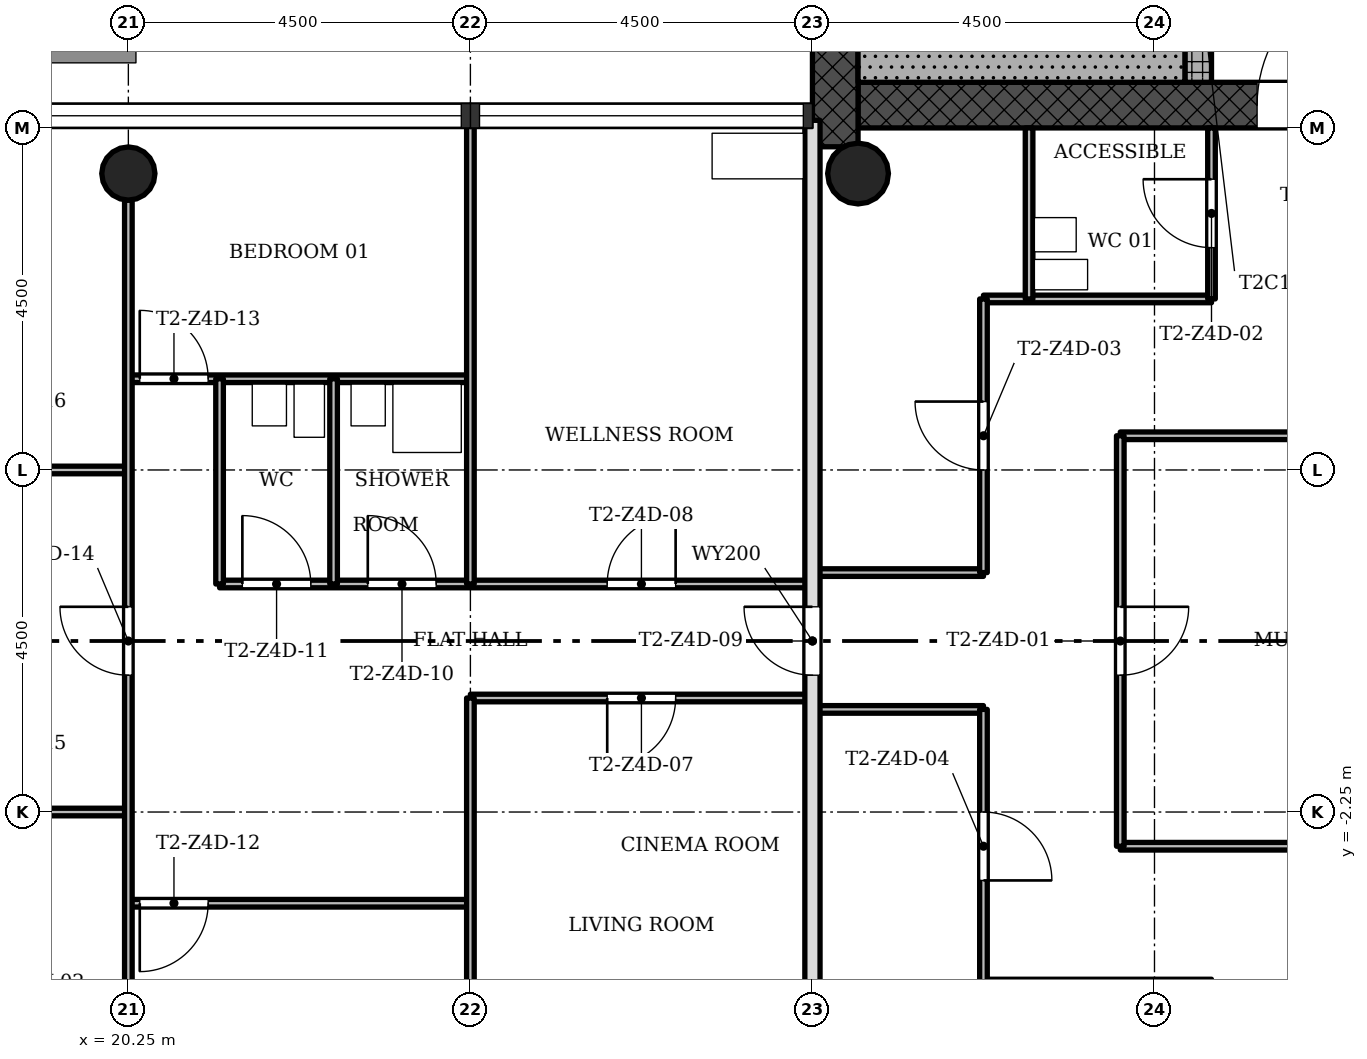
"""IFC4 building model, lengths in metres.
Left out: names, types, materials, properties, quantities, classifications, styles, units other than length and angle.
Written with IfcOpenShell. Run it as: python <this file> out.ifc"""

import sys

from ifc_helpers import new_model, si_unit, direction, frame, frame_2d, origin, origin_2d, place, context, subcontext, project, spatial, rectangle, hollow_circle, extrude, element, fill, save


model = new_model("IFC4")
c1 = context("Model", 3, precision=1e-05, world=origin(), true_north=direction((0.0, 1.0)))
c2 = subcontext(c1, "Body", "Model", "MODEL_VIEW")
j1 = project(units=[si_unit("LENGTHUNIT", "METRE"), si_unit("PLANEANGLEUNIT", "RADIAN")], contexts=[c1])
p1 = place(None, origin())
s1 = spatial("IfcSite", under=j1, at=p1, CompositionType="ELEMENT")
p2 = place(p1, origin())
s2 = spatial("IfcBuilding", under=s1, at=p2, CompositionType="ELEMENT")
p3 = place(p2, frame((0.0, 0.0, 196.0)))
s3 = spatial("IfcBuildingStorey", under=s2, at=p3, CompositionType="ELEMENT", Elevation=196.0)
p4 = place(p3, frame((29.85, 7.05, 0.0), z_axis=(0.0, 0.0, 1.0), x_axis=(1.0, 0.0, 0.0)))
e1 = element("IfcWall", 1, at=p4, inside=s3, PredefinedType="SHEAR", context=c2, shape_type="SweptSolid", body=[
    extrude(rectangle(XDim=12.9, YDim=0.6, at=frame_2d((6.45, 0.0))), origin(), (0.0, 0.0, 1.0), 3.4),
])
p5 = place(p4, frame((5.25, 0.0, 0.0)))
e2 = element("IfcOpeningElement", 2, at=p5, cuts=e1, PredefinedType="OPENING", context=c2, shape_type="SweptSolid", body=[
    extrude(rectangle(XDim=1.8, YDim=2.1, at=frame_2d((0.9, 1.05))), frame((0.0, 0.31, 0.0), z_axis=(0.0, -1.0, 0.0), x_axis=(1.0, 0.0, 0.0)), (0.0, 0.0, 1.0), 0.62),
])
p6 = place(p3, frame((29.55, 15.15, 0.0), z_axis=(0.0, 0.0, 1.0), x_axis=(0.0, -1.0, 0.0)))
e3 = element("IfcWall", 3, at=p6, inside=s3, PredefinedType="SHEAR", context=c2, shape_type="SweptSolid", body=[
    extrude(rectangle(XDim=8.648, YDim=0.6, at=frame_2d((4.324, 0.0))), origin(), (0.0, 0.0, 1.0), 3.4),
])
p7 = place(p3, frame((34.325, 7.35, 0.0), z_axis=(0.0, 0.0, 1.0), x_axis=(0.0, 1.0, 0.0)))
e4 = element("IfcWall", 4, at=p7, inside=s3, PredefinedType="SHEAR", context=c2, shape_type="SweptSolid", body=[
    extrude(rectangle(XDim=7.8, YDim=0.35, at=frame_2d((3.9, 0.0))), origin(), (0.0, 0.0, 1.0), 3.4),
])
p8 = place(p7, frame((1.05, 0.0, 0.0)))
e5 = element("IfcOpeningElement", 5, at=p8, cuts=e4, PredefinedType="OPENING", context=c2, shape_type="SweptSolid", body=[
    extrude(rectangle(XDim=0.9, YDim=2.1, at=frame_2d((0.45, 1.05))), frame((0.0, 0.185, 0.0), z_axis=(0.0, -1.0, 0.0), x_axis=(1.0, 0.0, 0.0)), (0.0, 0.0, 1.0), 0.37),
])
p9 = place(p3, frame((20.25, 6.15, 0.0), z_axis=(0.0, 0.0, 1.0), x_axis=(1.0, 0.0, 0.0)))
e6 = element("IfcColumn", 6, at=p9, inside=s3, PredefinedType="COLUMN", context=c2, shape_type="SweptSolid", body=[
    extrude(hollow_circle(Radius=0.35, WallThickness=0.025, at=origin_2d()), origin(), (0.0, 0.0, 1.0), 3.4),
])
p10 = place(p3, frame((29.85, 6.15, 0.0), z_axis=(0.0, 0.0, 1.0), x_axis=(1.0, 0.0, 0.0)))
e7 = element("IfcColumn", 7, at=p10, inside=s3, PredefinedType="COLUMN", context=c2, shape_type="SweptSolid", body=[
    extrude(hollow_circle(Radius=0.4, WallThickness=0.028, at=origin_2d()), origin(), (0.0, 0.0, 1.0), 3.4),
])
p11 = place(p3, frame((24.75, -3.45, 0.0), z_axis=(0.0, 0.0, 1.0), x_axis=(-1.0, 0.0, 0.0)))
e8 = element("IfcWall", 8, at=p11, inside=s3, PredefinedType="PARTITIONING", context=c2, shape_type="SweptSolid", body=[
    extrude(rectangle(XDim=4.5, YDim=0.1, at=frame_2d((2.25, 0.0))), origin(), (0.0, 0.0, 1.0), 3.0),
])
p12 = place(p11, frame((3.45, 0.0, 0.0)))
e9 = element("IfcOpeningElement", 9, at=p12, cuts=e8, PredefinedType="OPENING", context=c2, shape_type="SweptSolid", body=[
    extrude(rectangle(XDim=0.9, YDim=2.1, at=frame_2d((0.45, 1.05))), frame((0.0, 0.06, 0.0), z_axis=(0.0, -1.0, 0.0), x_axis=(1.0, 0.0, 0.0)), (0.0, 0.0, 1.0), 0.12),
])
p13 = place(p3, frame((38.7, -2.7, 0.0), z_axis=(0.0, 0.0, 1.0), x_axis=(-1.0, 0.0, 0.0)))
e10 = element("IfcWall", 10, at=p13, inside=s3, PredefinedType="PARTITIONING", context=c2, shape_type="SweptSolid", body=[
    extrude(rectangle(XDim=5.4, YDim=0.1, at=frame_2d((2.7, 0.0))), origin(), (0.0, 0.0, 1.0), 3.0),
])
p14 = place(p3, frame((20.25, -2.25, 0.0), z_axis=(0.0, 0.0, 1.0), x_axis=(-1.0, 0.0, 0.0)))
e11 = element("IfcWall", 11, at=p14, inside=s3, PredefinedType="PARTITIONING", context=c2, shape_type="SweptSolid", body=[
    extrude(rectangle(XDim=4.6, YDim=0.1, at=frame_2d((2.3, 0.0))), origin(), (0.0, 0.0, 1.0), 3.0),
])
p15 = place(p14, frame((1.05, 0.0, 0.0)))
e12 = element("IfcOpeningElement", 12, at=p15, cuts=e11, PredefinedType="OPENING", context=c2, shape_type="SweptSolid", body=[
    extrude(rectangle(XDim=0.9, YDim=2.1, at=frame_2d((0.45, 1.05))), frame((0.0, 0.06, 0.0), z_axis=(0.0, -1.0, 0.0), x_axis=(1.0, 0.0, 0.0)), (0.0, 0.0, 1.0), 0.12),
])
p16 = place(p3, frame((31.5, -0.9, 0.0), z_axis=(0.0, 0.0, 1.0), x_axis=(-1.0, 0.0, 0.0)))
e13 = element("IfcWall", 13, at=p16, inside=s3, PredefinedType="PARTITIONING", context=c2, shape_type="SweptSolid", body=[
    extrude(rectangle(XDim=2.25, YDim=0.1, at=frame_2d((1.125, 0.0))), origin(), (0.0, 0.0, 1.0), 3.0),
])
p17 = place(p3, frame((29.25, -0.75, 0.0), z_axis=(0.0, 0.0, 1.0), x_axis=(-1.0, 0.0, 0.0)))
e14 = element("IfcWall", 14, at=p17, inside=s3, PredefinedType="PARTITIONING", context=c2, shape_type="SweptSolid", body=[
    extrude(rectangle(XDim=4.5, YDim=0.1, at=frame_2d((2.25, 0.0))), origin(), (0.0, 0.0, 1.0), 3.0),
])
p18 = place(p17, frame((1.8, 0.0, 0.0)))
e15 = element("IfcOpeningElement", 15, at=p18, cuts=e14, PredefinedType="OPENING", context=c2, shape_type="SweptSolid", body=[
    extrude(rectangle(XDim=0.9, YDim=2.1, at=frame_2d((0.45, 1.05))), frame((0.0, 0.06, 0.0), z_axis=(0.0, -1.0, 0.0), x_axis=(1.0, 0.0, 0.0)), (0.0, 0.0, 1.0), 0.12),
])
p19 = place(p3, frame((29.25, 0.75, 0.0), z_axis=(0.0, 0.0, 1.0), x_axis=(-1.0, 0.0, 0.0)))
e16 = element("IfcWall", 16, at=p19, inside=s3, PredefinedType="PARTITIONING", context=c2, shape_type="SweptSolid", body=[
    extrude(rectangle(XDim=7.8, YDim=0.1, at=frame_2d((3.9, 0.0))), origin(), (0.0, 0.0, 1.0), 3.0),
])
p20 = place(p19, frame((1.8, 0.0, 0.0)))
e17 = element("IfcOpeningElement", 17, at=p20, cuts=e16, PredefinedType="OPENING", context=c2, shape_type="SweptSolid", body=[
    extrude(rectangle(XDim=0.9, YDim=2.1, at=frame_2d((0.45, 1.05))), frame((0.0, 0.06, 0.0), z_axis=(0.0, -1.0, 0.0), x_axis=(1.0, 0.0, 0.0)), (0.0, 0.0, 1.0), 0.12),
])
p21 = place(p19, frame((4.95, 0.0, 0.0)))
e18 = element("IfcOpeningElement", 18, at=p21, cuts=e16, PredefinedType="OPENING", context=c2, shape_type="SweptSolid", body=[
    extrude(rectangle(XDim=0.9, YDim=2.1, at=frame_2d((0.45, 1.05))), frame((0.0, 0.06, 0.0), z_axis=(0.0, -1.0, 0.0), x_axis=(1.0, 0.0, 0.0)), (0.0, 0.0, 1.0), 0.12),
])
p22 = place(p19, frame((6.6, 0.0, 0.0)))
e19 = element("IfcOpeningElement", 19, at=p22, cuts=e16, PredefinedType="OPENING", context=c2, shape_type="SweptSolid", body=[
    extrude(rectangle(XDim=0.9, YDim=2.1, at=frame_2d((0.45, 1.05))), frame((0.0, 0.06, 0.0), z_axis=(0.0, -1.0, 0.0), x_axis=(1.0, 0.0, 0.0)), (0.0, 0.0, 1.0), 0.12),
])
p23 = place(p3, frame((31.5, 0.9, 0.0), z_axis=(0.0, 0.0, 1.0), x_axis=(-1.0, 0.0, 0.0)))
e20 = element("IfcWall", 20, at=p23, inside=s3, PredefinedType="PARTITIONING", context=c2, shape_type="SweptSolid", body=[
    extrude(rectangle(XDim=2.25, YDim=0.1, at=frame_2d((1.125, 0.0))), origin(), (0.0, 0.0, 1.0), 3.0),
])
p24 = place(p3, frame((20.25, 2.25, 0.0), z_axis=(0.0, 0.0, 1.0), x_axis=(-1.0, 0.0, 0.0)))
e21 = element("IfcWall", 21, at=p24, inside=s3, PredefinedType="PARTITIONING", context=c2, shape_type="SweptSolid", body=[
    extrude(rectangle(XDim=4.6, YDim=0.1, at=frame_2d((2.3, 0.0))), origin(), (0.0, 0.0, 1.0), 3.0),
])
p25 = place(p24, frame((1.05, 0.0, 0.0)))
e22 = element("IfcOpeningElement", 22, at=p25, cuts=e21, PredefinedType="OPENING", context=c2, shape_type="SweptSolid", body=[
    extrude(rectangle(XDim=0.9, YDim=2.1, at=frame_2d((0.45, 1.05))), frame((0.0, 0.06, 0.0), z_axis=(0.0, -1.0, 0.0), x_axis=(1.0, 0.0, 0.0)), (0.0, 0.0, 1.0), 0.12),
])
p26 = place(p3, frame((38.7, 2.7, 0.0), z_axis=(0.0, 0.0, 1.0), x_axis=(-1.0, 0.0, 0.0)))
e23 = element("IfcWall", 23, at=p26, inside=s3, PredefinedType="PARTITIONING", context=c2, shape_type="SweptSolid", body=[
    extrude(rectangle(XDim=5.4, YDim=0.1, at=frame_2d((2.7, 0.0))), origin(), (0.0, 0.0, 1.0), 3.0),
])
p27 = place(p3, frame((24.75, 3.45, 0.0), z_axis=(0.0, 0.0, 1.0), x_axis=(-1.0, 0.0, 0.0)))
e24 = element("IfcWall", 24, at=p27, inside=s3, PredefinedType="PARTITIONING", context=c2, shape_type="SweptSolid", body=[
    extrude(rectangle(XDim=4.5, YDim=0.1, at=frame_2d((2.25, 0.0))), origin(), (0.0, 0.0, 1.0), 3.0),
])
p28 = place(p27, frame((3.45, 0.0, 0.0)))
e25 = element("IfcOpeningElement", 25, at=p28, cuts=e24, PredefinedType="OPENING", context=c2, shape_type="SweptSolid", body=[
    extrude(rectangle(XDim=0.9, YDim=2.1, at=frame_2d((0.45, 1.05))), frame((0.0, 0.06, 0.0), z_axis=(0.0, -1.0, 0.0), x_axis=(1.0, 0.0, 0.0)), (0.0, 0.0, 1.0), 0.12),
])
p29 = place(p3, frame((34.5, 4.5, 0.0), z_axis=(0.0, 0.0, 1.0), x_axis=(-1.0, 0.0, 0.0)))
e26 = element("IfcWall", 26, at=p29, inside=s3, PredefinedType="PARTITIONING", context=c2, shape_type="SweptSolid", body=[
    extrude(rectangle(XDim=3.0, YDim=0.1, at=frame_2d((1.5, 0.0))), origin(), (0.0, 0.0, 1.0), 3.0),
])
p30 = place(p3, frame((34.5, 4.5, 0.0), z_axis=(0.0, 0.0, 1.0), x_axis=(0.0, 1.0, 0.0)))
e27 = element("IfcWall", 27, at=p30, inside=s3, PredefinedType="PARTITIONING", context=c2, shape_type="SweptSolid", body=[
    extrude(rectangle(XDim=2.25, YDim=0.1, at=frame_2d((1.125, 0.0))), origin(), (0.0, 0.0, 1.0), 3.0),
])
p31 = place(p30, frame((0.675, 0.0, 0.0)))
e28 = element("IfcOpeningElement", 28, at=p31, cuts=e27, PredefinedType="OPENING", context=c2, shape_type="SweptSolid", body=[
    extrude(rectangle(XDim=0.9, YDim=2.1, at=frame_2d((0.45, 1.05))), frame((0.0, 0.06, 0.0), z_axis=(0.0, -1.0, 0.0), x_axis=(1.0, 0.0, 0.0)), (0.0, 0.0, 1.0), 0.12),
])
p32 = place(p3, frame((33.3, -2.7, 0.0), z_axis=(0.0, 0.0, 1.0), x_axis=(0.0, 1.0, 0.0)))
e29 = element("IfcWall", 29, at=p32, inside=s3, PredefinedType="PARTITIONING", context=c2, shape_type="SweptSolid", body=[
    extrude(rectangle(XDim=5.4, YDim=0.1, at=frame_2d((2.7, 0.0))), origin(), (0.0, 0.0, 1.0), 3.0),
])
p33 = place(p32, frame((2.25, 0.0, 0.0)))
e30 = element("IfcOpeningElement", 30, at=p33, cuts=e29, PredefinedType="OPENING", context=c2, shape_type="SweptSolid", body=[
    extrude(rectangle(XDim=0.9, YDim=2.1, at=frame_2d((0.45, 1.05))), frame((0.0, 0.06, 0.0), z_axis=(0.0, -1.0, 0.0), x_axis=(1.0, 0.0, 0.0)), (0.0, 0.0, 1.0), 0.12),
])
p34 = place(p3, frame((32.1, 4.5, 0.0), z_axis=(0.0, 0.0, 1.0), x_axis=(0.0, 1.0, 0.0)))
e31 = element("IfcWall", 31, at=p34, inside=s3, PredefinedType="PARTITIONING", context=c2, shape_type="SweptSolid", body=[
    extrude(rectangle(XDim=2.25, YDim=0.1, at=frame_2d((1.125, 0.0))), origin(), (0.0, 0.0, 1.0), 3.0),
])
p35 = place(p3, frame((31.5, -4.5, 0.0), z_axis=(0.0, 0.0, 1.0), x_axis=(0.0, 1.0, 0.0)))
e32 = element("IfcWall", 32, at=p35, inside=s3, PredefinedType="PARTITIONING", context=c2, shape_type="SweptSolid", body=[
    extrude(rectangle(XDim=3.6, YDim=0.1, at=frame_2d((1.8, 0.0))), origin(), (0.0, 0.0, 1.0), 3.0),
])
p36 = place(p35, frame((1.35, 0.0, 0.0)))
e33 = element("IfcOpeningElement", 33, at=p36, cuts=e32, PredefinedType="OPENING", context=c2, shape_type="SweptSolid", body=[
    extrude(rectangle(XDim=0.9, YDim=2.1, at=frame_2d((0.45, 1.05))), frame((0.0, 0.06, 0.0), z_axis=(0.0, -1.0, 0.0), x_axis=(1.0, 0.0, 0.0)), (0.0, 0.0, 1.0), 0.12),
])
p37 = place(p3, frame((31.5, 0.9, 0.0), z_axis=(0.0, 0.0, 1.0), x_axis=(0.0, 1.0, 0.0)))
e34 = element("IfcWall", 34, at=p37, inside=s3, PredefinedType="PARTITIONING", context=c2, shape_type="SweptSolid", body=[
    extrude(rectangle(XDim=3.6, YDim=0.1, at=frame_2d((1.8, 0.0))), origin(), (0.0, 0.0, 1.0), 3.0),
])
p38 = place(p37, frame((1.35, 0.0, 0.0)))
e35 = element("IfcOpeningElement", 35, at=p38, cuts=e34, PredefinedType="OPENING", context=c2, shape_type="SweptSolid", body=[
    extrude(rectangle(XDim=0.9, YDim=2.1, at=frame_2d((0.45, 1.05))), frame((0.0, 0.06, 0.0), z_axis=(0.0, -1.0, 0.0), x_axis=(1.0, 0.0, 0.0)), (0.0, 0.0, 1.0), 0.12),
])
p39 = place(p3, frame((29.25, -6.85, 0.0), z_axis=(0.0, 0.0, 1.0), x_axis=(0.0, 1.0, 0.0)))
e36 = element("IfcWall", 36, at=p39, inside=s3, PredefinedType="SOLIDWALL", context=c2, shape_type="SweptSolid", body=[
    extrude(rectangle(XDim=13.7, YDim=0.2, at=frame_2d((6.85, 0.0))), origin(), (0.0, 0.0, 1.0), 3.0),
])
p40 = place(p39, frame((6.4, 0.0, 0.0)))
e37 = element("IfcOpeningElement", 37, at=p40, cuts=e36, PredefinedType="OPENING", context=c2, shape_type="SweptSolid", body=[
    extrude(rectangle(XDim=0.9, YDim=2.1, at=frame_2d((0.45, 1.05))), frame((0.0, 0.11, 0.0), z_axis=(0.0, -1.0, 0.0), x_axis=(1.0, 0.0, 0.0)), (0.0, 0.0, 1.0), 0.22),
])
for number, where, z_axis, x_axis in (
    (38, (24.75, -6.85, 0.0), (0.0, 0.0, 1.0), (0.0, 1.0, 0.0)),
    (39, (24.75, 0.75, 0.0), (0.0, 0.0, 1.0), (0.0, 1.0, 0.0)),
):
    element("IfcWall", number, at=place(p3, frame(where, z_axis=z_axis, x_axis=x_axis)), inside=s3, PredefinedType="PARTITIONING", context=c2, shape_type="SweptSolid", body=[
        extrude(rectangle(XDim=6.1, YDim=0.1, at=frame_2d((3.05, 0.0))), origin(), (0.0, 0.0, 1.0), 3.0),
    ])
for number, where, z_axis, x_axis in (
    (40, (22.95, 0.75, 0.0), (0.0, 0.0, 1.0), (0.0, 1.0, 0.0)),
    (41, (21.45, 0.75, 0.0), (0.0, 0.0, 1.0), (0.0, 1.0, 0.0)),
):
    element("IfcWall", number, at=place(p3, frame(where, z_axis=z_axis, x_axis=x_axis)), inside=s3, PredefinedType="PARTITIONING", context=c2, shape_type="SweptSolid", body=[
        extrude(rectangle(XDim=2.7, YDim=0.1, at=frame_2d((1.35, 0.0))), origin(), (0.0, 0.0, 1.0), 3.0),
    ])
p41 = place(p3, frame((20.25, -5.8, 0.0), z_axis=(0.0, 0.0, 1.0), x_axis=(0.0, 1.0, 0.0)))
e42 = element("IfcWall", 42, at=p41, inside=s3, PredefinedType="PARTITIONING", context=c2, shape_type="SweptSolid", body=[
    extrude(rectangle(XDim=11.6, YDim=0.1, at=frame_2d((5.8, 0.0))), origin(), (0.0, 0.0, 1.0), 3.0),
])
p42 = place(p41, frame((5.35, 0.0, 0.0)))
e43 = element("IfcOpeningElement", 43, at=p42, cuts=e42, PredefinedType="OPENING", context=c2, shape_type="SweptSolid", body=[
    extrude(rectangle(XDim=0.9, YDim=2.1, at=frame_2d((0.45, 1.05))), frame((0.0, 0.06, 0.0), z_axis=(0.0, -1.0, 0.0), x_axis=(1.0, 0.0, 0.0)), (0.0, 0.0, 1.0), 0.12),
])
p43 = place(p3, frame((34.15, 7.65, 0.0), z_axis=(0.0, 0.0, 1.0), x_axis=(-1.0, 0.0, 0.0)))
e44 = element("IfcWall", 44, at=p43, inside=s3, PredefinedType="SHEAR", context=c2, shape_type="SweptSolid", body=[
    extrude(rectangle(XDim=4.3, YDim=0.6, at=frame_2d((2.15, 0.0))), origin(), (0.0, 0.0, 1.0), 3.4),
])
p44 = place(p33, origin())
e45 = element("IfcDoor", 45, at=p44, inside=s3, OperationType="SINGLE_SWING_RIGHT", PredefinedType="DOOR", context=c2, shape_type="SweptSolid", body=[
    extrude(rectangle(XDim=0.9, YDim=2.1, at=frame_2d((0.45, 1.05))), frame((0.0, 0.025, 0.0), z_axis=(0.0, -1.0, 0.0), x_axis=(1.0, 0.0, 0.0)), (0.0, 0.0, 1.0), 0.05),
])
fill(e30, e45)
p45 = place(p31, origin())
e46 = element("IfcDoor", 46, at=p45, inside=s3, OperationType="SINGLE_SWING_LEFT", PredefinedType="DOOR", context=c2, shape_type="SweptSolid", body=[
    extrude(rectangle(XDim=0.9, YDim=2.1, at=frame_2d((0.45, 1.05))), frame((0.0, 0.025, 0.0), z_axis=(0.0, -1.0, 0.0), x_axis=(1.0, 0.0, 0.0)), (0.0, 0.0, 1.0), 0.05),
])
fill(e28, e46)
p46 = place(p38, origin())
e47 = element("IfcDoor", 47, at=p46, inside=s3, OperationType="SINGLE_SWING_LEFT", PredefinedType="DOOR", context=c2, shape_type="SweptSolid", body=[
    extrude(rectangle(XDim=0.9, YDim=2.1, at=frame_2d((0.45, 1.05))), frame((0.0, 0.025, 0.0), z_axis=(0.0, -1.0, 0.0), x_axis=(1.0, 0.0, 0.0)), (0.0, 0.0, 1.0), 0.05),
])
fill(e35, e47)
p47 = place(p36, origin())
e48 = element("IfcDoor", 48, at=p47, inside=s3, OperationType="SINGLE_SWING_LEFT", PredefinedType="DOOR", context=c2, shape_type="SweptSolid", body=[
    extrude(rectangle(XDim=0.9, YDim=2.1, at=frame_2d((0.45, 1.05))), frame((0.0, 0.025, 0.0), z_axis=(0.0, -1.0, 0.0), x_axis=(1.0, 0.0, 0.0)), (0.0, 0.0, 1.0), 0.05),
])
fill(e33, e48)
p48 = place(p18, origin())
e49 = element("IfcDoor", 49, at=p48, inside=s3, OperationType="SINGLE_SWING_LEFT", PredefinedType="DOOR", context=c2, shape_type="SweptSolid", body=[
    extrude(rectangle(XDim=0.9, YDim=2.1, at=frame_2d((0.45, 1.05))), frame((0.0, 0.025, 0.0), z_axis=(0.0, -1.0, 0.0), x_axis=(1.0, 0.0, 0.0)), (0.0, 0.0, 1.0), 0.05),
])
fill(e15, e49)
p49 = place(p20, origin())
e50 = element("IfcDoor", 50, at=p49, inside=s3, OperationType="SINGLE_SWING_LEFT", PredefinedType="DOOR", context=c2, shape_type="SweptSolid", body=[
    extrude(rectangle(XDim=0.9, YDim=2.1, at=frame_2d((0.45, 1.05))), frame((0.0, 0.025, 0.0), z_axis=(0.0, -1.0, 0.0), x_axis=(1.0, 0.0, 0.0)), (0.0, 0.0, 1.0), 0.05),
])
fill(e17, e50)
p50 = place(p40, origin())
e51 = element("IfcDoor", 51, at=p50, inside=s3, OperationType="SINGLE_SWING_LEFT", PredefinedType="DOOR", context=c2, shape_type="SweptSolid", body=[
    extrude(rectangle(XDim=0.9, YDim=2.1, at=frame_2d((0.45, 1.05))), frame((0.0, 0.025, 0.0), z_axis=(0.0, -1.0, 0.0), x_axis=(1.0, 0.0, 0.0)), (0.0, 0.0, 1.0), 0.05),
])
fill(e37, e51)
p51 = place(p21, origin())
e52 = element("IfcDoor", 52, at=p51, inside=s3, OperationType="SINGLE_SWING_RIGHT", PredefinedType="DOOR", context=c2, shape_type="SweptSolid", body=[
    extrude(rectangle(XDim=0.9, YDim=2.1, at=frame_2d((0.45, 1.05))), frame((0.0, 0.025, 0.0), z_axis=(0.0, -1.0, 0.0), x_axis=(1.0, 0.0, 0.0)), (0.0, 0.0, 1.0), 0.05),
])
fill(e18, e52)
p52 = place(p22, origin())
e53 = element("IfcDoor", 53, at=p52, inside=s3, OperationType="SINGLE_SWING_RIGHT", PredefinedType="DOOR", context=c2, shape_type="SweptSolid", body=[
    extrude(rectangle(XDim=0.9, YDim=2.1, at=frame_2d((0.45, 1.05))), frame((0.0, 0.025, 0.0), z_axis=(0.0, -1.0, 0.0), x_axis=(1.0, 0.0, 0.0)), (0.0, 0.0, 1.0), 0.05),
])
fill(e19, e53)
p53 = place(p12, origin())
e54 = element("IfcDoor", 54, at=p53, inside=s3, OperationType="SINGLE_SWING_LEFT", PredefinedType="DOOR", context=c2, shape_type="SweptSolid", body=[
    extrude(rectangle(XDim=0.9, YDim=2.1, at=frame_2d((0.45, 1.05))), frame((0.0, 0.025, 0.0), z_axis=(0.0, -1.0, 0.0), x_axis=(1.0, 0.0, 0.0)), (0.0, 0.0, 1.0), 0.05),
])
fill(e9, e54)
p54 = place(p28, origin())
e55 = element("IfcDoor", 55, at=p54, inside=s3, OperationType="SINGLE_SWING_RIGHT", PredefinedType="DOOR", context=c2, shape_type="SweptSolid", body=[
    extrude(rectangle(XDim=0.9, YDim=2.1, at=frame_2d((0.45, 1.05))), frame((0.0, 0.025, 0.0), z_axis=(0.0, -1.0, 0.0), x_axis=(1.0, 0.0, 0.0)), (0.0, 0.0, 1.0), 0.05),
])
fill(e25, e55)
p55 = place(p42, origin())
e56 = element("IfcDoor", 56, at=p55, inside=s3, OperationType="SINGLE_SWING_LEFT", PredefinedType="DOOR", context=c2, shape_type="SweptSolid", body=[
    extrude(rectangle(XDim=0.9, YDim=2.1, at=frame_2d((0.45, 1.05))), frame((0.0, 0.025, 0.0), z_axis=(0.0, -1.0, 0.0), x_axis=(1.0, 0.0, 0.0)), (0.0, 0.0, 1.0), 0.05),
])
fill(e43, e56)
p56 = place(p5, origin())
e57 = element("IfcDoor", 57, at=p56, inside=s3, OperationType="SINGLE_SWING_LEFT", PredefinedType="DOOR", context=c2, shape_type="SweptSolid", body=[
    extrude(rectangle(XDim=1.8, YDim=2.1, at=frame_2d((0.9, 1.05))), frame((0.0, 0.025, 0.0), z_axis=(0.0, -1.0, 0.0), x_axis=(1.0, 0.0, 0.0)), (0.0, 0.0, 1.0), 0.05),
])
fill(e2, e57)
save(model, sys.argv[1])
